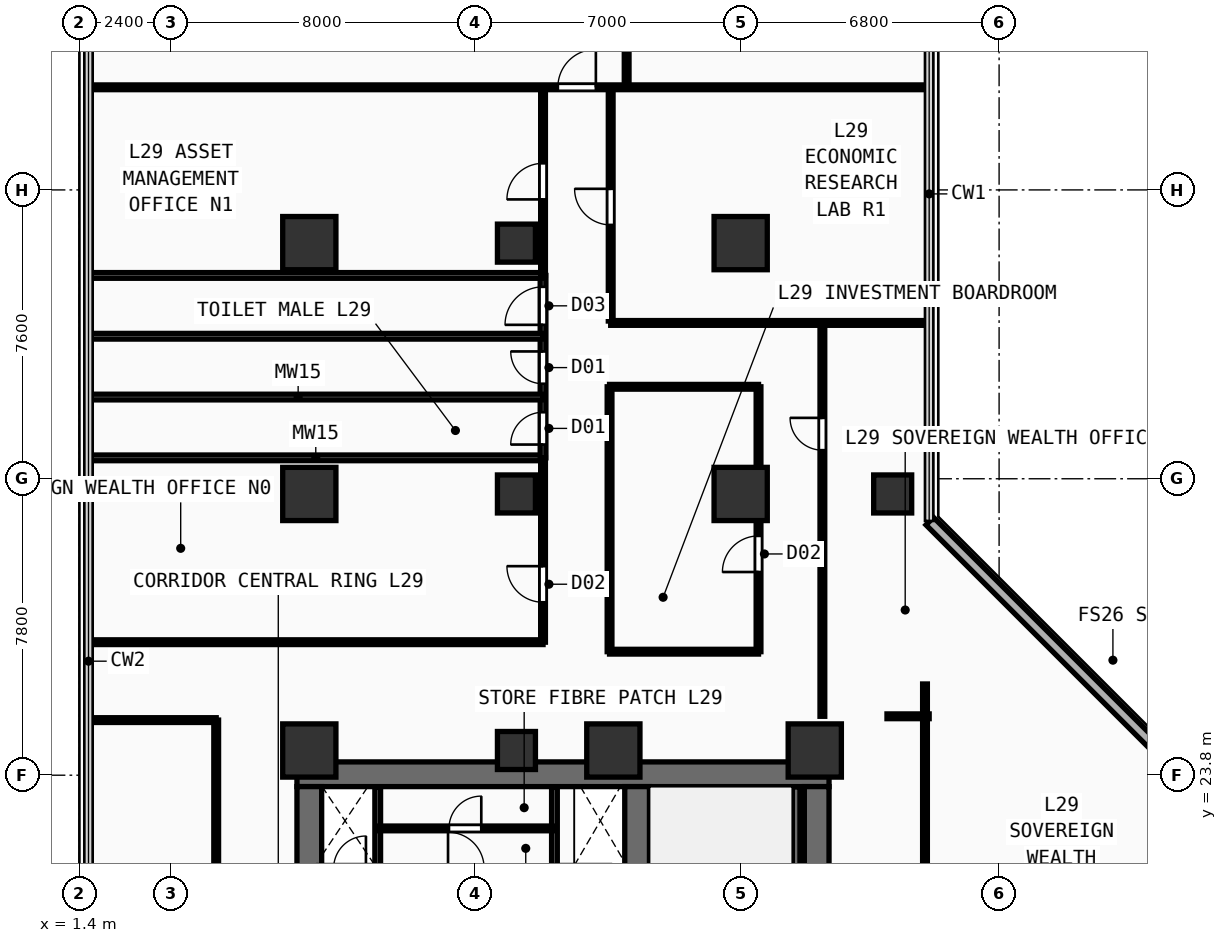
"""IFC4 building model, lengths in metres.
Left out: names, types, materials, properties, quantities, classifications, styles, units other than length and angle.
Written with IfcOpenShell. Run it as: python <this file> out.ifc"""

import sys

from ifc_helpers import new_model, si_unit, direction, frame, frame_2d, origin, origin_2d, place, context, subcontext, project, spatial, rectangle, extrude, element, fill, save


model = new_model("IFC4")
c1 = context("Model", 3, precision=1e-05, world=origin(), true_north=direction((0.0, 1.0)))
c2 = subcontext(c1, "Body", "Model", "MODEL_VIEW")
j1 = project(units=[si_unit("LENGTHUNIT", "METRE"), si_unit("PLANEANGLEUNIT", "RADIAN")], contexts=[c1])
p1 = place(None, origin())
s1 = spatial("IfcSite", under=j1, at=p1, CompositionType="ELEMENT")
p2 = place(p1, origin())
s2 = spatial("IfcBuilding", under=s1, at=p2, CompositionType="ELEMENT")
p3 = place(p2, frame((0.0, 0.0, 114.5)))
s3 = spatial("IfcBuildingStorey", under=s2, at=p3, CompositionType="ELEMENT", Elevation=114.5)
p4 = place(p3, frame((7.125, 23.825, 0.0), z_axis=(0.0, 0.0, 1.0), x_axis=(1.0, 0.0, 0.0)))
e1 = element("IfcWall", 1, at=p4, inside=s3, PredefinedType="SHEAR", context=c2, shape_type="SweptSolid", body=[
    extrude(rectangle(XDim=14.0, YDim=0.65, at=frame_2d((7.0, 0.0))), origin(), (0.0, 0.0, 1.0), 3.54),
])
p5 = place(p3, frame((7.45, 21.24, 0.0), z_axis=(0.0, 0.0, 1.0), x_axis=(0.0, 1.0, 0.0)))
e2 = element("IfcWall", 2, at=p5, inside=s3, PredefinedType="SHEAR", context=c2, shape_type="SweptSolid", body=[
    extrude(rectangle(XDim=2.26, YDim=0.65, at=frame_2d((1.13, 0.0))), origin(), (0.0, 0.0, 1.0), 3.54),
])
p6 = place(p3, frame((20.8, 17.35, 0.0), z_axis=(0.0, 0.0, 1.0), x_axis=(0.0, 1.0, 0.0)))
e3 = element("IfcWall", 3, at=p6, inside=s3, PredefinedType="SHEAR", context=c2, shape_type="SweptSolid", body=[
    extrude(rectangle(XDim=6.15, YDim=0.65, at=frame_2d((3.075, 0.0))), origin(), (0.0, 0.0, 1.0), 3.54),
])
p7 = place(p3, frame((16.075, 14.4, 0.0), z_axis=(0.0, 0.0, 1.0), x_axis=(0.0, 1.0, 0.0)))
e4 = element("IfcWall", 4, at=p7, inside=s3, PredefinedType="SHEAR", context=c2, shape_type="SweptSolid", body=[
    extrude(rectangle(XDim=9.1, YDim=0.65, at=frame_2d((4.55, 0.0))), origin(), (0.0, 0.0, 1.0), 3.54),
])
for number, where, z_axis, x_axis in (
    (5, (7.45, 24.45, 0.0), (0.0, 0.0, 1.0), (1.0, 0.0, 0.0)),
    (6, (15.45, 24.45, 0.0), (0.0, 0.0, 1.0), (1.0, 0.0, 0.0)),
    (7, (20.75, 24.45, 0.0), (0.0, 0.0, 1.0), (1.0, 0.0, 0.0)),
    (8, (7.45, 31.2, 0.0), (0.0, 0.0, 1.0), (1.0, 0.0, 0.0)),
    (9, (7.45, 37.8, 0.0), (0.0, 0.0, 1.0), (1.0, 0.0, 0.0)),
    (10, (18.8, 31.2, 0.0), (0.0, 0.0, 1.0), (1.0, 0.0, 0.0)),
    (11, (18.8, 37.8, 0.0), (0.0, 0.0, 1.0), (1.0, 0.0, 0.0)),
):
    element("IfcColumn", number, at=place(p3, frame(where, z_axis=z_axis, x_axis=x_axis)), inside=s3, PredefinedType="COLUMN", context=c2, shape_type="SweptSolid", body=[
        extrude(rectangle(XDim=1.4, YDim=1.4, at=origin_2d()), origin(), (0.0, 0.0, 1.0), 3.54),
    ])
for number, where, z_axis, x_axis in (
    (12, (22.8, 31.2, 0.0), (0.0, 0.0, 1.0), (1.0, 0.0, 0.0)),
    (13, (12.9, 24.45, 0.0), (0.0, 0.0, 1.0), (1.0, 0.0, 0.0)),
    (14, (12.9, 31.2, 0.0), (0.0, 0.0, 1.0), (1.0, 0.0, 0.0)),
    (15, (12.9, 37.8, 0.0), (0.0, 0.0, 1.0), (1.0, 0.0, 0.0)),
):
    element("IfcColumn", number, at=place(p3, frame(where, z_axis=z_axis, x_axis=x_axis)), inside=s3, PredefinedType="COLUMN", context=c2, shape_type="SweptSolid", body=[
        extrude(rectangle(XDim=1.0, YDim=1.0, at=origin_2d()), origin(), (0.0, 0.0, 1.0), 3.54),
    ])
p8 = place(p3, frame((30.285, 23.975, 0.0), z_axis=(0.0, 0.0, 1.0), x_axis=(-0.707106781187, 0.707106781187, 0.0)))
e16 = element("IfcWall", 16, at=p8, inside=s3, PredefinedType="SOLIDWALL", context=c2, shape_type="SweptSolid", body=[
    extrude(rectangle(XDim=9.207, YDim=0.28, at=frame_2d((4.603, 0.0))), origin(), (0.0, 0.0, 1.0), 3.54),
])
p9 = place(p3, frame((20.26, 15.4, 0.0), z_axis=(0.0, 0.0, 1.0), x_axis=(0.0, 1.0, 0.0)))
e17 = element("IfcWall", 17, at=p9, inside=s3, PredefinedType="SHEAR", context=c2, shape_type="SweptSolid", body=[
    extrude(rectangle(XDim=8.09, YDim=0.2, at=frame_2d((4.045, 0.0))), origin(), (0.0, 0.0, 1.0), 3.54),
])
for number, where, z_axis, x_axis in (
    (18, (9.25, 21.35, 0.0), (0.0, 0.0, 1.0), (0.0, 1.0, 0.0)),
    (19, (13.9, 21.35, 0.0), (0.0, 0.0, 1.0), (0.0, 1.0, 0.0)),
):
    element("IfcWall", number, at=place(p3, frame(where, z_axis=z_axis, x_axis=x_axis)), inside=s3, PredefinedType="PARTITIONING", context=c2, shape_type="SweptSolid", body=[
        extrude(rectangle(XDim=2.13, YDim=0.15, at=frame_2d((1.065, 0.0))), origin(), (0.0, 0.0, 1.0), 3.54),
    ])
p10 = place(p3, frame((9.25, 22.4, 0.0), z_axis=(0.0, 0.0, 1.0), x_axis=(1.0, 0.0, 0.0)))
e20 = element("IfcWall", 20, at=p10, inside=s3, PredefinedType="PARTITIONING", context=c2, shape_type="SweptSolid", body=[
    extrude(rectangle(XDim=4.65, YDim=0.125, at=frame_2d((2.325, 0.0))), origin(), (0.0, 0.0, 1.0), 3.54),
])
p11 = place(p10, frame((1.875, 0.0, 0.0)))
e21 = element("IfcOpeningElement", 21, at=p11, cuts=e20, PredefinedType="OPENING", context=c2, shape_type="SweptSolid", body=[
    extrude(rectangle(XDim=0.85, YDim=2.15, at=frame_2d((0.425, 1.075))), frame((0.0, 0.073, 0.0), z_axis=(0.0, -1.0, 0.0), x_axis=(1.0, 0.0, 0.0)), (0.0, 0.0, 1.0), 0.145),
])
for number, where, z_axis, x_axis in (
    (22, (15.35, 27.05, 0.0), (0.0, 0.0, 1.0), (1.0, 0.0, 0.0)),
    (23, (15.35, 34.02, 0.0), (0.0, 0.0, 1.0), (1.0, 0.0, 0.0)),
):
    element("IfcWall", number, at=place(p3, frame(where, z_axis=z_axis, x_axis=x_axis)), inside=s3, PredefinedType="PARTITIONING", context=c2, shape_type="SweptSolid", body=[
        extrude(rectangle(XDim=3.92, YDim=0.125, at=frame_2d((1.96, 0.0))), origin(), (0.0, 0.0, 1.0), 3.54),
    ])
p12 = place(p3, frame((15.35, 27.05, 0.0), z_axis=(0.0, 0.0, 1.0), x_axis=(0.0, 1.0, 0.0)))
e24 = element("IfcWall", 24, at=p12, inside=s3, PredefinedType="PARTITIONING", context=c2, shape_type="SweptSolid", body=[
    extrude(rectangle(XDim=6.97, YDim=0.125, at=frame_2d((3.485, 0.0))), origin(), (0.0, 0.0, 1.0), 3.54),
])
p13 = place(p3, frame((19.27, 27.05, 0.0), z_axis=(0.0, 0.0, 1.0), x_axis=(0.0, 1.0, 0.0)))
e25 = element("IfcWall", 25, at=p13, inside=s3, PredefinedType="PARTITIONING", context=c2, shape_type="SweptSolid", body=[
    extrude(rectangle(XDim=6.97, YDim=0.125, at=frame_2d((3.485, 0.0))), origin(), (0.0, 0.0, 1.0), 3.54),
])
p14 = place(p13, frame((2.096, 0.0, 0.0)))
e26 = element("IfcOpeningElement", 26, at=p14, cuts=e25, PredefinedType="OPENING", context=c2, shape_type="SweptSolid", body=[
    extrude(rectangle(XDim=0.95, YDim=2.15, at=frame_2d((0.475, 1.075))), frame((0.0, 0.073, 0.0), z_axis=(0.0, -1.0, 0.0), x_axis=(1.0, 0.0, 0.0)), (0.0, 0.0, 1.0), 0.145),
])
p15 = place(p3, frame((13.6, 27.3, 0.0), z_axis=(0.0, 0.0, 1.0), x_axis=(0.0, 1.0, 0.0)))
e27 = element("IfcWall", 27, at=p15, inside=s3, PredefinedType="PARTITIONING", context=c2, shape_type="SweptSolid", body=[
    extrude(rectangle(XDim=4.85, YDim=0.125, at=frame_2d((2.425, 0.0))), origin(), (0.0, 0.0, 1.0), 3.54),
])
p16 = place(p15, frame((1.05, 0.0, 0.0)))
e28 = element("IfcOpeningElement", 28, at=p16, cuts=e27, PredefinedType="OPENING", context=c2, shape_type="SweptSolid", body=[
    extrude(rectangle(XDim=0.95, YDim=2.15, at=frame_2d((0.475, 1.075))), frame((0.0, 0.073, 0.0), z_axis=(0.0, -1.0, 0.0), x_axis=(1.0, 0.0, 0.0)), (0.0, 0.0, 1.0), 0.145),
])
p17 = place(p3, frame((1.64, 27.3, 0.0), z_axis=(0.0, 0.0, 1.0), x_axis=(1.0, 0.0, 0.0)))
e29 = element("IfcWall", 29, at=p17, inside=s3, PredefinedType="PARTITIONING", context=c2, shape_type="SweptSolid", body=[
    extrude(rectangle(XDim=11.96, YDim=0.125, at=frame_2d((5.98, 0.0))), origin(), (0.0, 0.0, 1.0), 3.54),
])
p18 = place(p3, frame((1.64, 32.15, 0.0), z_axis=(0.0, 0.0, 1.0), x_axis=(1.0, 0.0, 0.0)))
e30 = element("IfcWall", 30, at=p18, inside=s3, PredefinedType="PLUMBINGWALL", context=c2, shape_type="SweptSolid", body=[
    extrude(rectangle(XDim=11.96, YDim=0.15, at=frame_2d((5.98, 0.0))), origin(), (0.0, 0.0, 1.0), 3.54),
])
p19 = place(p3, frame((13.6, 32.15, 0.0), z_axis=(0.0, 0.0, 1.0), x_axis=(0.0, 1.0, 0.0)))
e31 = element("IfcWall", 31, at=p19, inside=s3, PredefinedType="PLUMBINGWALL", context=c2, shape_type="SweptSolid", body=[
    extrude(rectangle(XDim=4.8, YDim=0.15, at=frame_2d((2.4, 0.0))), origin(), (0.0, 0.0, 1.0), 3.54),
])
p20 = place(p19, frame((0.35, 0.0, 0.0)))
e32 = element("IfcOpeningElement", 32, at=p20, cuts=e31, PredefinedType="OPENING", context=c2, shape_type="SweptSolid", body=[
    extrude(rectangle(XDim=0.85, YDim=2.15, at=frame_2d((0.425, 1.075))), frame((0.0, 0.085, 0.0), z_axis=(0.0, -1.0, 0.0), x_axis=(1.0, 0.0, 0.0)), (0.0, 0.0, 1.0), 0.17),
])
p21 = place(p19, frame((1.95, 0.0, 0.0)))
e33 = element("IfcOpeningElement", 33, at=p21, cuts=e31, PredefinedType="OPENING", context=c2, shape_type="SweptSolid", body=[
    extrude(rectangle(XDim=0.85, YDim=2.15, at=frame_2d((0.425, 1.075))), frame((0.0, 0.085, 0.0), z_axis=(0.0, -1.0, 0.0), x_axis=(1.0, 0.0, 0.0)), (0.0, 0.0, 1.0), 0.17),
])
p22 = place(p19, frame((3.5, 0.0, 0.0)))
e34 = element("IfcOpeningElement", 34, at=p22, cuts=e31, PredefinedType="OPENING", context=c2, shape_type="SweptSolid", body=[
    extrude(rectangle(XDim=1.0, YDim=2.2, at=frame_2d((0.5, 1.1))), frame((0.0, 0.085, 0.0), z_axis=(0.0, -1.0, 0.0), x_axis=(1.0, 0.0, 0.0)), (0.0, 0.0, 1.0), 0.17),
])
for number, where, z_axis, x_axis in (
    (35, (1.64, 33.75, 0.0), (0.0, 0.0, 1.0), (1.0, 0.0, 0.0)),
    (36, (1.64, 35.35, 0.0), (0.0, 0.0, 1.0), (1.0, 0.0, 0.0)),
):
    element("IfcWall", number, at=place(p3, frame(where, z_axis=z_axis, x_axis=x_axis)), inside=s3, PredefinedType="PLUMBINGWALL", context=c2, shape_type="SweptSolid", body=[
        extrude(rectangle(XDim=11.96, YDim=0.15, at=frame_2d((5.98, 0.0))), origin(), (0.0, 0.0, 1.0), 3.09),
    ])
p23 = place(p3, frame((1.64, 36.95, 0.0), z_axis=(0.0, 0.0, 1.0), x_axis=(1.0, 0.0, 0.0)))
e37 = element("IfcWall", 37, at=p23, inside=s3, PredefinedType="PLUMBINGWALL", context=c2, shape_type="SweptSolid", body=[
    extrude(rectangle(XDim=11.96, YDim=0.15, at=frame_2d((5.98, 0.0))), origin(), (0.0, 0.0, 1.0), 3.54),
])
p24 = place(p3, frame((5.0, 7.5, 0.0), z_axis=(0.0, 0.0, 1.0), x_axis=(0.0, 1.0, 0.0)))
e38 = element("IfcWall", 38, at=p24, inside=s3, PredefinedType="PARTITIONING", context=c2, shape_type="SweptSolid", body=[
    extrude(rectangle(XDim=17.75, YDim=0.125, at=frame_2d((8.875, 0.0))), origin(), (0.0, 0.0, 1.0), 3.54),
])
p25 = place(p24, frame((3.55, 0.0, 0.0)))
e39 = element("IfcOpeningElement", 39, at=p25, cuts=e38, PredefinedType="OPENING", context=c2, shape_type="SweptSolid", body=[
    extrude(rectangle(XDim=0.95, YDim=2.15, at=frame_2d((0.475, 1.075))), frame((0.0, 0.073, 0.0), z_axis=(0.0, -1.0, 0.0), x_axis=(1.0, 0.0, 0.0)), (0.0, 0.0, 1.0), 0.145),
])
p26 = place(p24, frame((12.521, 0.0, 0.0)))
e40 = element("IfcOpeningElement", 40, at=p26, cuts=e38, PredefinedType="OPENING", context=c2, shape_type="SweptSolid", body=[
    extrude(rectangle(XDim=0.95, YDim=2.15, at=frame_2d((0.475, 1.075))), frame((0.0, 0.073, 0.0), z_axis=(0.0, -1.0, 0.0), x_axis=(1.0, 0.0, 0.0)), (0.0, 0.0, 1.0), 0.145),
])
p27 = place(p3, frame((1.64, 25.25, 0.0), z_axis=(0.0, 0.0, 1.0), x_axis=(1.0, 0.0, 0.0)))
e41 = element("IfcWall", 41, at=p27, inside=s3, PredefinedType="PARTITIONING", context=c2, shape_type="SweptSolid", body=[
    extrude(rectangle(XDim=3.36, YDim=0.125, at=frame_2d((1.68, 0.0))), origin(), (0.0, 0.0, 1.0), 3.54),
])
p28 = place(p3, frame((20.95, 25.35, 0.0), z_axis=(0.0, 0.0, 1.0), x_axis=(0.0, 1.0, 0.0)))
e42 = element("IfcWall", 42, at=p28, inside=s3, PredefinedType="PARTITIONING", context=c2, shape_type="SweptSolid", body=[
    extrude(rectangle(XDim=10.35, YDim=0.125, at=frame_2d((5.175, 0.0))), origin(), (0.0, 0.0, 1.0), 3.54),
])
p29 = place(p28, frame((7.002, 0.0, 0.0)))
e43 = element("IfcOpeningElement", 43, at=p29, cuts=e42, PredefinedType="OPENING", context=c2, shape_type="SweptSolid", body=[
    extrude(rectangle(XDim=0.85, YDim=2.15, at=frame_2d((0.425, 1.075))), frame((0.0, 0.073, 0.0), z_axis=(0.0, -1.0, 0.0), x_axis=(1.0, 0.0, 0.0)), (0.0, 0.0, 1.0), 0.145),
])
p30 = place(p3, frame((22.65, 25.35, 0.0), z_axis=(0.0, 0.0, 1.0), x_axis=(1.0, 0.0, 0.0)))
e44 = element("IfcWall", 44, at=p30, inside=s3, PredefinedType="PARTITIONING", context=c2, shape_type="SweptSolid", body=[
    extrude(rectangle(XDim=1.11, YDim=0.125, at=frame_2d((0.555, 0.0))), origin(), (0.0, 0.0, 1.0), 3.54),
])
p31 = place(p3, frame((15.38, 35.7, 0.0), z_axis=(0.0, 0.0, 1.0), x_axis=(1.0, 0.0, 0.0)))
e45 = element("IfcWall", 45, at=p31, inside=s3, PredefinedType="PARTITIONING", context=c2, shape_type="SweptSolid", body=[
    extrude(rectangle(XDim=8.38, YDim=0.125, at=frame_2d((4.19, 0.0))), origin(), (0.0, 0.0, 1.0), 3.09),
])
p32 = place(p3, frame((23.65, 15.19, 0.0), z_axis=(0.0, 0.0, 1.0), x_axis=(0.0, 1.0, 0.0)))
e46 = element("IfcWall", 46, at=p32, inside=s3, PredefinedType="PARTITIONING", context=c2, shape_type="SweptSolid", body=[
    extrude(rectangle(XDim=11.01, YDim=0.125, at=frame_2d((5.505, 0.0))), origin(), (0.0, 0.0, 1.0), 3.54),
])
p33 = place(p3, frame((13.6, 36.95, 0.0), z_axis=(0.0, 0.0, 1.0), x_axis=(0.0, 1.0, 0.0)))
e47 = element("IfcWall", 47, at=p33, inside=s3, PredefinedType="PARTITIONING", context=c2, shape_type="SweptSolid", body=[
    extrude(rectangle(XDim=4.95, YDim=0.125, at=frame_2d((2.475, 0.0))), origin(), (0.0, 0.0, 1.0), 3.54),
])
p34 = place(p33, frame((2.0, 0.0, 0.0)))
e48 = element("IfcOpeningElement", 48, at=p34, cuts=e47, PredefinedType="OPENING", context=c2, shape_type="SweptSolid", body=[
    extrude(rectangle(XDim=0.95, YDim=2.15, at=frame_2d((0.475, 1.075))), frame((0.0, 0.073, 0.0), z_axis=(0.0, -1.0, 0.0), x_axis=(1.0, 0.0, 0.0)), (0.0, 0.0, 1.0), 0.145),
])
p35 = place(p3, frame((1.64, 41.9, 0.0), z_axis=(0.0, 0.0, 1.0), x_axis=(1.0, 0.0, 0.0)))
e49 = element("IfcWall", 49, at=p35, inside=s3, PredefinedType="PARTITIONING", context=c2, shape_type="SweptSolid", body=[
    extrude(rectangle(XDim=22.12, YDim=0.125, at=frame_2d((11.06, 0.0))), origin(), (0.0, 0.0, 1.0), 3.54),
])
p36 = place(p35, frame((12.35, 0.0, 0.0)))
e50 = element("IfcOpeningElement", 50, at=p36, cuts=e49, PredefinedType="OPENING", context=c2, shape_type="SweptSolid", body=[
    extrude(rectangle(XDim=1.0, YDim=2.2, at=frame_2d((0.5, 1.1))), frame((0.0, 0.073, 0.0), z_axis=(0.0, -1.0, 0.0), x_axis=(1.0, 0.0, 0.0)), (0.0, 0.0, 1.0), 0.145),
])
p37 = place(p3, frame((15.8, 41.9, 0.0), z_axis=(0.0, 0.0, 1.0), x_axis=(0.0, 1.0, 0.0)))
e51 = element("IfcWall", 51, at=p37, inside=s3, PredefinedType="PARTITIONING", context=c2, shape_type="SweptSolid", body=[
    extrude(rectangle(XDim=8.66, YDim=0.125, at=frame_2d((4.33, 0.0))), origin(), (0.0, 0.0, 1.0), 3.54),
])
p38 = place(p37, frame((3.779, 0.0, 0.0)))
e52 = element("IfcOpeningElement", 52, at=p38, cuts=e51, PredefinedType="OPENING", context=c2, shape_type="SweptSolid", body=[
    extrude(rectangle(XDim=0.95, YDim=2.15, at=frame_2d((0.475, 1.075))), frame((0.0, 0.073, 0.0), z_axis=(0.0, -1.0, 0.0), x_axis=(1.0, 0.0, 0.0)), (0.0, 0.0, 1.0), 0.145),
])
p39 = place(p3, frame((15.38, 35.75, 0.0), z_axis=(0.0, 0.0, 1.0), x_axis=(0.0, 1.0, 0.0)))
e53 = element("IfcWall", 53, at=p39, inside=s3, PredefinedType="PARTITIONING", context=c2, shape_type="SweptSolid", body=[
    extrude(rectangle(XDim=6.15, YDim=0.125, at=frame_2d((3.075, 0.0))), origin(), (0.0, 0.0, 1.0), 3.54),
])
p40 = place(p39, frame((2.529, 0.0, 0.0)))
e54 = element("IfcOpeningElement", 54, at=p40, cuts=e53, PredefinedType="OPENING", context=c2, shape_type="SweptSolid", body=[
    extrude(rectangle(XDim=0.95, YDim=2.15, at=frame_2d((0.475, 1.075))), frame((0.0, 0.073, 0.0), z_axis=(0.0, -1.0, 0.0), x_axis=(1.0, 0.0, 0.0)), (0.0, 0.0, 1.0), 0.145),
])
p41 = place(p11, origin())
e55 = element("IfcDoor", 55, at=p41, inside=s3, OperationType="SINGLE_SWING_RIGHT", PredefinedType="DOOR", context=c2, shape_type="SweptSolid", body=[
    extrude(rectangle(XDim=0.85, YDim=2.15, at=frame_2d((0.425, 1.075))), frame((0.0, 0.025, 0.0), z_axis=(0.0, -1.0, 0.0), x_axis=(1.0, 0.0, 0.0)), (0.0, 0.0, 1.0), 0.05),
])
fill(e21, e55)
p42 = place(p14, origin())
e56 = element("IfcDoor", 56, at=p42, inside=s3, OperationType="SINGLE_SWING_LEFT", PredefinedType="DOOR", context=c2, shape_type="SweptSolid", body=[
    extrude(rectangle(XDim=0.95, YDim=2.15, at=frame_2d((0.475, 1.075))), frame((0.0, 0.025, 0.0), z_axis=(0.0, -1.0, 0.0), x_axis=(1.0, 0.0, 0.0)), (0.0, 0.0, 1.0), 0.05),
])
fill(e26, e56)
p43 = place(p16, origin())
e57 = element("IfcDoor", 57, at=p43, inside=s3, OperationType="SINGLE_SWING_RIGHT", PredefinedType="DOOR", context=c2, shape_type="SweptSolid", body=[
    extrude(rectangle(XDim=0.95, YDim=2.15, at=frame_2d((0.475, 1.075))), frame((0.0, 0.025, 0.0), z_axis=(0.0, -1.0, 0.0), x_axis=(1.0, 0.0, 0.0)), (0.0, 0.0, 1.0), 0.05),
])
fill(e28, e57)
p44 = place(p20, origin())
e58 = element("IfcDoor", 58, at=p44, inside=s3, OperationType="SINGLE_SWING_LEFT", PredefinedType="DOOR", context=c2, shape_type="SweptSolid", body=[
    extrude(rectangle(XDim=0.85, YDim=2.15, at=frame_2d((0.425, 1.075))), frame((0.0, 0.025, 0.0), z_axis=(0.0, -1.0, 0.0), x_axis=(1.0, 0.0, 0.0)), (0.0, 0.0, 1.0), 0.05),
])
fill(e32, e58)
p45 = place(p21, origin())
e59 = element("IfcDoor", 59, at=p45, inside=s3, OperationType="SINGLE_SWING_RIGHT", PredefinedType="DOOR", context=c2, shape_type="SweptSolid", body=[
    extrude(rectangle(XDim=0.85, YDim=2.15, at=frame_2d((0.425, 1.075))), frame((0.0, 0.025, 0.0), z_axis=(0.0, -1.0, 0.0), x_axis=(1.0, 0.0, 0.0)), (0.0, 0.0, 1.0), 0.05),
])
fill(e33, e59)
p46 = place(p22, origin())
e60 = element("IfcDoor", 60, at=p46, inside=s3, OperationType="SINGLE_SWING_LEFT", PredefinedType="DOOR", context=c2, shape_type="SweptSolid", body=[
    extrude(rectangle(XDim=1.0, YDim=2.2, at=frame_2d((0.5, 1.1))), frame((0.0, 0.025, 0.0), z_axis=(0.0, -1.0, 0.0), x_axis=(1.0, 0.0, 0.0)), (0.0, 0.0, 1.0), 0.05),
])
fill(e34, e60)
p47 = place(p29, origin())
e61 = element("IfcDoor", 61, at=p47, inside=s3, OperationType="SINGLE_SWING_RIGHT", PredefinedType="DOOR", context=c2, shape_type="SweptSolid", body=[
    extrude(rectangle(XDim=0.85, YDim=2.15, at=frame_2d((0.425, 1.075))), frame((0.0, 0.025, 0.0), z_axis=(0.0, -1.0, 0.0), x_axis=(1.0, 0.0, 0.0)), (0.0, 0.0, 1.0), 0.05),
])
fill(e43, e61)
p48 = place(p34, origin())
e62 = element("IfcDoor", 62, at=p48, inside=s3, OperationType="SINGLE_SWING_LEFT", PredefinedType="DOOR", context=c2, shape_type="SweptSolid", body=[
    extrude(rectangle(XDim=0.95, YDim=2.15, at=frame_2d((0.475, 1.075))), frame((0.0, 0.025, 0.0), z_axis=(0.0, -1.0, 0.0), x_axis=(1.0, 0.0, 0.0)), (0.0, 0.0, 1.0), 0.05),
])
fill(e48, e62)
p49 = place(p36, origin())
e63 = element("IfcDoor", 63, at=p49, inside=s3, OperationType="SINGLE_SWING_RIGHT", PredefinedType="DOOR", context=c2, shape_type="SweptSolid", body=[
    extrude(rectangle(XDim=1.0, YDim=2.2, at=frame_2d((0.5, 1.1))), frame((0.0, 0.025, 0.0), z_axis=(0.0, -1.0, 0.0), x_axis=(1.0, 0.0, 0.0)), (0.0, 0.0, 1.0), 0.05),
])
fill(e50, e63)
p50 = place(p40, origin())
e64 = element("IfcDoor", 64, at=p50, inside=s3, OperationType="SINGLE_SWING_RIGHT", PredefinedType="DOOR", context=c2, shape_type="SweptSolid", body=[
    extrude(rectangle(XDim=0.95, YDim=2.15, at=frame_2d((0.475, 1.075))), frame((0.0, 0.025, 0.0), z_axis=(0.0, -1.0, 0.0), x_axis=(1.0, 0.0, 0.0)), (0.0, 0.0, 1.0), 0.05),
])
fill(e54, e64)
save(model, sys.argv[1])
